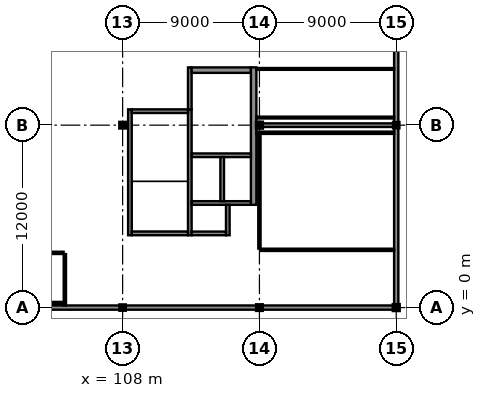
"""IFC4 building model, lengths in metres.
Left out: names, types, materials, properties, quantities, classifications, styles, units other than length and angle.
Written with IfcOpenShell. Run it as: python <this file> out.ifc"""

import sys

from ifc_helpers import new_model, si_unit, direction, frame, frame_2d, origin, origin_2d, place, context, subcontext, project, spatial, rectangle, i_section, extrude, element, fill, save


model = new_model("IFC4")
c1 = context("Model", 3, precision=1e-05, world=origin(), true_north=direction((0.0, 1.0)))
c2 = subcontext(c1, "Body", "Model", "MODEL_VIEW")
j1 = project(units=[si_unit("LENGTHUNIT", "METRE"), si_unit("PLANEANGLEUNIT", "RADIAN")], contexts=[c1])
p1 = place(None, origin())
s1 = spatial("IfcSite", under=j1, at=p1, CompositionType="ELEMENT")
p2 = place(p1, origin())
s2 = spatial("IfcBuilding", under=s1, at=p2, CompositionType="ELEMENT")
p3 = place(p2, frame((0.0, 0.0, 31.4)))
s3 = spatial("IfcBuildingStorey", under=s2, at=p3, CompositionType="ELEMENT", Elevation=31.4)
p4 = place(p3, frame((108.0, 0.0, 0.0), z_axis=(0.0, 0.0, 1.0), x_axis=(1.0, 0.0, 0.0)))
e1 = element("IfcColumn", 1, at=p4, inside=s3, PredefinedType="COLUMN", context=c2, shape_type="SweptSolid", body=[
    extrude(i_section(OverallWidth=0.26, OverallDepth=0.26, WebThickness=0.01, FlangeThickness=0.018, at=origin_2d()), origin(), (0.0, 0.0, 1.0), 4.0),
])
for number, where, z_axis, x_axis in (
    (2, (108.0, 12.0, 0.0), (0.0, 0.0, 1.0), (1.0, 0.0, 0.0)),
    (3, (117.0, 0.0, 0.0), (0.0, 0.0, 1.0), (1.0, 0.0, 0.0)),
):
    element("IfcColumn", number, at=place(p3, frame(where, z_axis=z_axis, x_axis=x_axis)), inside=s3, PredefinedType="COLUMN", context=c2, shape_type="SweptSolid", body=[
        extrude(i_section(OverallWidth=0.28, OverallDepth=0.28, WebThickness=0.01, FlangeThickness=0.018, at=origin_2d()), origin(), (0.0, 0.0, 1.0), 4.0),
    ])
for number, where, z_axis, x_axis in (
    (4, (117.0, 12.0, 0.0), (0.0, 0.0, 1.0), (0.0, 1.0, 0.0)),
    (5, (126.0, 0.0, 0.0), (0.0, 0.0, 1.0), (1.0, 0.0, 0.0)),
):
    element("IfcColumn", number, at=place(p3, frame(where, z_axis=z_axis, x_axis=x_axis)), inside=s3, PredefinedType="COLUMN", context=c2, shape_type="SweptSolid", body=[
        extrude(i_section(OverallWidth=0.3, OverallDepth=0.3, WebThickness=0.011, FlangeThickness=0.019, at=origin_2d()), origin(), (0.0, 0.0, 1.0), 4.0),
    ])
p5 = place(p3, frame((126.0, 12.0, 0.0), z_axis=(0.0, 0.0, 1.0), x_axis=(1.0, 0.0, 0.0)))
e6 = element("IfcColumn", 6, at=p5, inside=s3, PredefinedType="COLUMN", context=c2, shape_type="SweptSolid", body=[
    extrude(i_section(OverallWidth=0.26, OverallDepth=0.26, WebThickness=0.01, FlangeThickness=0.018, at=origin_2d()), origin(), (0.0, 0.0, 1.0), 4.0),
])
p6 = place(p3, frame((99.058, 0.0, 0.0), z_axis=(0.0, 0.0, 1.0), x_axis=(1.0, 0.0, 0.0)))
e7 = element("IfcWall", 7, at=p6, inside=s3, PredefinedType="SOLIDWALL", context=c2, shape_type="SweptSolid", body=[
    extrude(rectangle(XDim=8.934, YDim=0.28, at=frame_2d((4.467, 0.0))), origin(), (0.0, 0.0, 1.0), 3.355),
])
p7 = place(p6, frame((2.03, 0.0, 1.05)))
e8 = element("IfcOpeningElement", 8, at=p7, cuts=e7, PredefinedType="OPENING", context=c2, shape_type="SweptSolid", body=[
    extrude(rectangle(XDim=1.3, YDim=1.3, at=frame_2d((0.65, 0.65))), frame((0.0, 0.155, 0.0), z_axis=(0.0, -1.0, 0.0), x_axis=(1.0, 0.0, 0.0)), (0.0, 0.0, 1.0), 0.31),
])
p8 = place(p6, frame((5.604, 0.0, 1.05)))
e9 = element("IfcOpeningElement", 9, at=p8, cuts=e7, PredefinedType="OPENING", context=c2, shape_type="SweptSolid", body=[
    extrude(rectangle(XDim=1.3, YDim=1.3, at=frame_2d((0.65, 0.65))), frame((0.0, 0.155, 0.0), z_axis=(0.0, -1.0, 0.0), x_axis=(1.0, 0.0, 0.0)), (0.0, 0.0, 1.0), 0.31),
])
p9 = place(p3, frame((108.008, 0.0, 0.0), z_axis=(0.0, 0.0, 1.0), x_axis=(1.0, 0.0, 0.0)))
e10 = element("IfcWall", 10, at=p9, inside=s3, PredefinedType="SOLIDWALL", context=c2, shape_type="SweptSolid", body=[
    extrude(rectangle(XDim=8.984, YDim=0.28, at=frame_2d((4.492, 0.0))), origin(), (0.0, 0.0, 1.0), 3.355),
])
p10 = place(p9, frame((2.045, 0.0, 1.05)))
e11 = element("IfcOpeningElement", 11, at=p10, cuts=e10, PredefinedType="OPENING", context=c2, shape_type="SweptSolid", body=[
    extrude(rectangle(XDim=1.3, YDim=1.3, at=frame_2d((0.65, 0.65))), frame((0.0, 0.155, 0.0), z_axis=(0.0, -1.0, 0.0), x_axis=(1.0, 0.0, 0.0)), (0.0, 0.0, 1.0), 0.31),
])
p11 = place(p9, frame((5.639, 0.0, 1.05)))
e12 = element("IfcOpeningElement", 12, at=p11, cuts=e10, PredefinedType="OPENING", context=c2, shape_type="SweptSolid", body=[
    extrude(rectangle(XDim=1.3, YDim=1.3, at=frame_2d((0.65, 0.65))), frame((0.0, 0.155, 0.0), z_axis=(0.0, -1.0, 0.0), x_axis=(1.0, 0.0, 0.0)), (0.0, 0.0, 1.0), 0.31),
])
p12 = place(p3, frame((117.008, 0.0, 0.0), z_axis=(0.0, 0.0, 1.0), x_axis=(1.0, 0.0, 0.0)))
e13 = element("IfcWall", 13, at=p12, inside=s3, PredefinedType="SOLIDWALL", context=c2, shape_type="SweptSolid", body=[
    extrude(rectangle(XDim=8.984, YDim=0.28, at=frame_2d((4.492, 0.0))), origin(), (0.0, 0.0, 1.0), 3.355),
])
p13 = place(p12, frame((2.045, 0.0, 1.05)))
e14 = element("IfcOpeningElement", 14, at=p13, cuts=e13, PredefinedType="OPENING", context=c2, shape_type="SweptSolid", body=[
    extrude(rectangle(XDim=1.3, YDim=1.3, at=frame_2d((0.65, 0.65))), frame((0.0, 0.155, 0.0), z_axis=(0.0, -1.0, 0.0), x_axis=(1.0, 0.0, 0.0)), (0.0, 0.0, 1.0), 0.31),
])
p14 = place(p12, frame((5.639, 0.0, 1.05)))
e15 = element("IfcOpeningElement", 15, at=p14, cuts=e13, PredefinedType="OPENING", context=c2, shape_type="SweptSolid", body=[
    extrude(rectangle(XDim=1.3, YDim=1.3, at=frame_2d((0.65, 0.65))), frame((0.0, 0.155, 0.0), z_axis=(0.0, -1.0, 0.0), x_axis=(1.0, 0.0, 0.0)), (0.0, 0.0, 1.0), 0.31),
])
p15 = place(p3, frame((126.0, 0.148, 0.0), z_axis=(0.0, 0.0, 1.0), x_axis=(0.0, 1.0, 0.0)))
e16 = element("IfcWall", 16, at=p15, inside=s3, PredefinedType="SOLIDWALL", context=c2, shape_type="SweptSolid", body=[
    extrude(rectangle(XDim=11.724, YDim=0.28, at=frame_2d((5.862, 0.0))), origin(), (0.0, 0.0, 1.0), 3.245),
])
p16 = place(p15, frame((2.012, 0.0, 1.05)))
e17 = element("IfcOpeningElement", 17, at=p16, cuts=e16, PredefinedType="OPENING", context=c2, shape_type="SweptSolid", body=[
    extrude(rectangle(XDim=1.3, YDim=1.3, at=frame_2d((0.65, 0.65))), frame((0.0, 0.155, 0.0), z_axis=(0.0, -1.0, 0.0), x_axis=(1.0, 0.0, 0.0)), (0.0, 0.0, 1.0), 0.31),
])
p17 = place(p15, frame((7.557, 0.0, 1.05)))
e18 = element("IfcOpeningElement", 18, at=p17, cuts=e16, PredefinedType="OPENING", context=c2, shape_type="SweptSolid", body=[
    extrude(rectangle(XDim=1.3, YDim=1.3, at=frame_2d((0.65, 0.65))), frame((0.0, 0.155, 0.0), z_axis=(0.0, -1.0, 0.0), x_axis=(1.0, 0.0, 0.0)), (0.0, 0.0, 1.0), 0.31),
])
p18 = place(p3, frame((126.0, 12.128, 0.0), z_axis=(0.0, 0.0, 1.0), x_axis=(0.0, 1.0, 0.0)))
e19 = element("IfcWall", 19, at=p18, inside=s3, PredefinedType="SOLIDWALL", context=c2, shape_type="SweptSolid", body=[
    extrude(rectangle(XDim=11.624, YDim=0.28, at=frame_2d((5.812, 0.0))), origin(), (0.0, 0.0, 1.0), 3.245),
])
p19 = place(p18, frame((2.032, 0.0, 1.05)))
e20 = element("IfcOpeningElement", 20, at=p19, cuts=e19, PredefinedType="OPENING", context=c2, shape_type="SweptSolid", body=[
    extrude(rectangle(XDim=1.3, YDim=1.3, at=frame_2d((0.65, 0.65))), frame((0.0, 0.155, 0.0), z_axis=(0.0, -1.0, 0.0), x_axis=(1.0, 0.0, 0.0)), (0.0, 0.0, 1.0), 0.31),
])
p20 = place(p18, frame((7.487, 0.0, 1.05)))
e21 = element("IfcOpeningElement", 21, at=p20, cuts=e19, PredefinedType="OPENING", context=c2, shape_type="SweptSolid", body=[
    extrude(rectangle(XDim=1.3, YDim=1.3, at=frame_2d((0.65, 0.65))), frame((0.0, 0.155, 0.0), z_axis=(0.0, -1.0, 0.0), x_axis=(1.0, 0.0, 0.0)), (0.0, 0.0, 1.0), 0.31),
])
p21 = place(p3, frame((108.48, 4.76, 0.0), z_axis=(0.0, 0.0, 1.0), x_axis=(0.0, 1.0, 0.0)))
e22 = element("IfcWall", 22, at=p21, inside=s3, PredefinedType="SHEAR", context=c2, shape_type="SweptSolid", body=[
    extrude(rectangle(XDim=8.28, YDim=0.24, at=frame_2d((4.14, 0.0))), origin(), (0.0, 0.0, 1.0), 3.81),
])
p22 = place(p3, frame((112.42, 4.76, 0.0), z_axis=(0.0, 0.0, 1.0), x_axis=(0.0, 1.0, 0.0)))
e23 = element("IfcWall", 23, at=p22, inside=s3, PredefinedType="SHEAR", context=c2, shape_type="SweptSolid", body=[
    extrude(rectangle(XDim=8.28, YDim=0.24, at=frame_2d((4.14, 0.0))), origin(), (0.0, 0.0, 1.0), 3.81),
])
p23 = place(p22, frame((6.49, 0.0, 0.0)))
e24 = element("IfcOpeningElement", 24, at=p23, cuts=e23, PredefinedType="OPENING", context=c2, shape_type="SweptSolid", body=[
    extrude(rectangle(XDim=1.3, YDim=2.2, at=frame_2d((0.65, 1.1))), frame((0.0, 0.135, 0.0), z_axis=(0.0, -1.0, 0.0), x_axis=(1.0, 0.0, 0.0)), (0.0, 0.0, 1.0), 0.27),
])
for number, where, z_axis, x_axis in (
    (25, (108.6, 4.88, 0.0), (0.0, 0.0, 1.0), (1.0, 0.0, 0.0)),
    (26, (108.6, 12.92, 0.0), (0.0, 0.0, 1.0), (1.0, 0.0, 0.0)),
):
    element("IfcWall", number, at=place(p3, frame(where, z_axis=z_axis, x_axis=x_axis)), inside=s3, PredefinedType="SHEAR", context=c2, shape_type="SweptSolid", body=[
        extrude(rectangle(XDim=3.7, YDim=0.24, at=frame_2d((1.85, 0.0))), origin(), (0.0, 0.0, 1.0), 3.81),
    ])
p24 = place(p3, frame((112.42, 13.04, 0.0), z_axis=(0.0, 0.0, 1.0), x_axis=(0.0, 1.0, 0.0)))
e27 = element("IfcWall", 27, at=p24, inside=s3, PredefinedType="SHEAR", context=c2, shape_type="SweptSolid", body=[
    extrude(rectangle(XDim=2.76, YDim=0.24, at=frame_2d((1.38, 0.0))), origin(), (0.0, 0.0, 1.0), 3.66),
])
p25 = place(p3, frame((112.54, 15.62, 0.0), z_axis=(0.0, 0.0, 1.0), x_axis=(1.0, 0.0, 0.0)))
e28 = element("IfcWall", 28, at=p25, inside=s3, PredefinedType="SHEAR", context=c2, shape_type="SweptSolid", body=[
    extrude(rectangle(XDim=3.9, YDim=0.36, at=frame_2d((1.95, 0.0))), origin(), (0.0, 0.0, 1.0), 3.66),
])
p26 = place(p25, frame((1.15, 0.0, 0.0)))
e29 = element("IfcOpeningElement", 29, at=p26, cuts=e28, PredefinedType="OPENING", context=c2, shape_type="SweptSolid", body=[
    extrude(rectangle(XDim=1.6, YDim=2.25, at=frame_2d((0.8, 1.125))), frame((0.0, 0.195, 0.0), z_axis=(0.0, -1.0, 0.0), x_axis=(1.0, 0.0, 0.0)), (0.0, 0.0, 1.0), 0.39),
])
p27 = place(p3, frame((116.62, 6.76, 0.0), z_axis=(0.0, 0.0, 1.0), x_axis=(0.0, 1.0, 0.0)))
e30 = element("IfcWall", 30, at=p27, inside=s3, PredefinedType="SHEAR", context=c2, shape_type="SweptSolid", body=[
    extrude(rectangle(XDim=9.04, YDim=0.36, at=frame_2d((4.52, 0.0))), origin(), (0.0, 0.0, 1.0), 3.66),
])
p28 = place(p3, frame((112.54, 10.02, 0.0), z_axis=(0.0, 0.0, 1.0), x_axis=(1.0, 0.0, 0.0)))
e31 = element("IfcWall", 31, at=p28, inside=s3, PredefinedType="SHEAR", context=c2, shape_type="SweptSolid", body=[
    extrude(rectangle(XDim=3.9, YDim=0.24, at=frame_2d((1.95, 0.0))), origin(), (0.0, 0.0, 1.0), 3.81),
])
p29 = place(p28, frame((0.235, 0.0, 0.0)))
e32 = element("IfcOpeningElement", 32, at=p29, cuts=e31, PredefinedType="OPENING", context=c2, shape_type="SweptSolid", body=[
    extrude(rectangle(XDim=1.6, YDim=2.3, at=frame_2d((0.8, 1.15))), frame((0.0, 0.135, 0.0), z_axis=(0.0, -1.0, 0.0), x_axis=(1.0, 0.0, 0.0)), (0.0, 0.0, 1.0), 0.27),
])
p30 = place(p28, frame((2.185, 0.0, 0.0)))
e33 = element("IfcOpeningElement", 33, at=p30, cuts=e31, PredefinedType="OPENING", context=c2, shape_type="SweptSolid", body=[
    extrude(rectangle(XDim=1.6, YDim=2.3, at=frame_2d((0.8, 1.15))), frame((0.0, 0.135, 0.0), z_axis=(0.0, -1.0, 0.0), x_axis=(1.0, 0.0, 0.0)), (0.0, 0.0, 1.0), 0.27),
])
p31 = place(p3, frame((112.54, 6.88, 0.0), z_axis=(0.0, 0.0, 1.0), x_axis=(1.0, 0.0, 0.0)))
e34 = element("IfcWall", 34, at=p31, inside=s3, PredefinedType="SHEAR", context=c2, shape_type="SweptSolid", body=[
    extrude(rectangle(XDim=3.9, YDim=0.24, at=frame_2d((1.95, 0.0))), origin(), (0.0, 0.0, 1.0), 3.81),
])
p32 = place(p3, frame((114.55, 7.0, 0.0), z_axis=(0.0, 0.0, 1.0), x_axis=(0.0, 1.0, 0.0)))
e35 = element("IfcWall", 35, at=p32, inside=s3, PredefinedType="SHEAR", context=c2, shape_type="SweptSolid", body=[
    extrude(rectangle(XDim=2.9, YDim=0.24, at=frame_2d((1.45, 0.0))), origin(), (0.0, 0.0, 1.0), 3.81),
])
p33 = place(p3, frame((114.92, 4.76, 0.0), z_axis=(0.0, 0.0, 1.0), x_axis=(0.0, 1.0, 0.0)))
e36 = element("IfcWall", 36, at=p33, inside=s3, PredefinedType="SHEAR", context=c2, shape_type="SweptSolid", body=[
    extrude(rectangle(XDim=2.0, YDim=0.24, at=frame_2d((1.0, 0.0))), origin(), (0.0, 0.0, 1.0), 3.81),
])
p34 = place(p3, frame((112.54, 4.88, 0.0), z_axis=(0.0, 0.0, 1.0), x_axis=(1.0, 0.0, 0.0)))
e37 = element("IfcWall", 37, at=p34, inside=s3, PredefinedType="SHEAR", context=c2, shape_type="SweptSolid", body=[
    extrude(rectangle(XDim=2.26, YDim=0.24, at=frame_2d((1.13, 0.0))), origin(), (0.0, 0.0, 1.0), 3.81),
])
p35 = place(p3, frame((117.148, 12.0, 0.0), z_axis=(0.0, 0.0, 1.0), x_axis=(1.0, 0.0, 0.0)))
e38 = element("IfcWall", 38, at=p35, inside=s3, PredefinedType="SHEAR", context=c2, shape_type="SweptSolid", body=[
    extrude(rectangle(XDim=8.844, YDim=0.24, at=frame_2d((4.422, 0.0))), origin(), (0.0, 0.0, 1.0), 3.305),
])
p36 = place(p3, frame((45.88, 3.6, 0.0), z_axis=(0.0, 0.0, 1.0), x_axis=(1.0, 0.0, 0.0)))
e39 = element("IfcWall", 39, at=p36, inside=s3, PredefinedType="PARTITIONING", context=c2, shape_type="SweptSolid", body=[
    extrude(rectangle(XDim=58.24, YDim=0.15, at=frame_2d((29.12, 0.0))), origin(), (0.0, 0.0, 1.0), 3.64),
])
p37 = place(p36, frame((27.795, 0.0, 0.0)))
e40 = element("IfcOpeningElement", 40, at=p37, cuts=e39, PredefinedType="OPENING", context=c2, shape_type="SweptSolid", body=[
    extrude(rectangle(XDim=1.05, YDim=2.25, at=frame_2d((0.525, 1.125))), frame((0.0, 0.09, 0.0), z_axis=(0.0, -1.0, 0.0), x_axis=(1.0, 0.0, 0.0)), (0.0, 0.0, 1.0), 0.18),
])
p38 = place(p3, frame((104.2, 3.52, 0.0), z_axis=(0.0, 0.0, 1.0), x_axis=(0.0, -1.0, 0.0)))
e41 = element("IfcWall", 41, at=p38, inside=s3, PredefinedType="PARTITIONING", context=c2, shape_type="SweptSolid", body=[
    extrude(rectangle(XDim=3.385, YDim=0.15, at=frame_2d((1.692, 0.0))), origin(), (0.0, 0.0, 1.0), 3.64),
])
p39 = place(p3, frame((104.13, 0.3, 0.0), z_axis=(0.0, 0.0, 1.0), x_axis=(-1.0, 0.0, 0.0)))
e42 = element("IfcWall", 42, at=p39, inside=s3, PredefinedType="PARTITIONING", context=c2, shape_type="SweptSolid", body=[
    extrude(rectangle(XDim=31.851, YDim=0.15, at=frame_2d((15.925, 0.0))), origin(), (0.0, 0.0, 1.0), 3.64),
])
p40 = place(p3, frame((117.0, 3.88, 0.0), z_axis=(0.0, 0.0, 1.0), x_axis=(0.0, 1.0, 0.0)))
e43 = element("IfcWall", 43, at=p40, inside=s3, PredefinedType="PARTITIONING", context=c2, shape_type="SweptSolid", body=[
    extrude(rectangle(XDim=7.54, YDim=0.15, at=frame_2d((3.77, 0.0))), origin(), (0.0, 0.0, 1.0), 3.305),
])
p41 = place(p3, frame((116.795, 11.5, 0.0), z_axis=(0.0, 0.0, 1.0), x_axis=(1.0, 0.0, 0.0)))
e44 = element("IfcWall", 44, at=p41, inside=s3, PredefinedType="PARTITIONING", context=c2, shape_type="SweptSolid", body=[
    extrude(rectangle(XDim=9.07, YDim=0.15, at=frame_2d((4.535, 0.0))), origin(), (0.0, 0.0, 1.0), 3.64),
])
p42 = place(p3, frame((125.865, 3.8, 0.0), z_axis=(0.0, 0.0, 1.0), x_axis=(-1.0, 0.0, 0.0)))
e45 = element("IfcWall", 45, at=p42, inside=s3, PredefinedType="PARTITIONING", context=c2, shape_type="SweptSolid", body=[
    extrude(rectangle(XDim=8.785, YDim=0.15, at=frame_2d((4.393, 0.0))), origin(), (0.0, 0.0, 1.0), 3.64),
])
p43 = place(p42, frame((3.867, 0.0, 0.0)))
e46 = element("IfcOpeningElement", 46, at=p43, cuts=e45, PredefinedType="OPENING", context=c2, shape_type="SweptSolid", body=[
    extrude(rectangle(XDim=1.05, YDim=2.25, at=frame_2d((0.525, 1.125))), frame((0.0, 0.09, 0.0), z_axis=(0.0, -1.0, 0.0), x_axis=(1.0, 0.0, 0.0)), (0.0, 0.0, 1.0), 0.18),
])
p44 = place(p3, frame((125.865, 12.5, 0.0), z_axis=(0.0, 0.0, 1.0), x_axis=(-1.0, 0.0, 0.0)))
e47 = element("IfcWall", 47, at=p44, inside=s3, PredefinedType="PARTITIONING", context=c2, shape_type="SweptSolid", body=[
    extrude(rectangle(XDim=9.07, YDim=0.12, at=frame_2d((4.535, 0.0))), origin(), (0.0, 0.0, 1.0), 3.64),
])
p45 = place(p3, frame((116.795, 15.7, 0.0), z_axis=(0.0, 0.0, 1.0), x_axis=(1.0, 0.0, 0.0)))
e48 = element("IfcWall", 48, at=p45, inside=s3, PredefinedType="PARTITIONING", context=c2, shape_type="SweptSolid", body=[
    extrude(rectangle(XDim=9.07, YDim=0.12, at=frame_2d((4.535, 0.0))), origin(), (0.0, 0.0, 1.0), 3.64),
])
p46 = place(p45, frame((4.06, 0.0, 0.0)))
e49 = element("IfcOpeningElement", 49, at=p46, cuts=e48, PredefinedType="OPENING", context=c2, shape_type="SweptSolid", body=[
    extrude(rectangle(XDim=0.95, YDim=2.15, at=frame_2d((0.475, 1.075))), frame((0.0, 0.075, 0.0), z_axis=(0.0, -1.0, 0.0), x_axis=(1.0, 0.0, 0.0)), (0.0, 0.0, 1.0), 0.15),
])
p47 = place(p8, origin())
e50 = element("IfcWindow", 50, at=p47, inside=s3, PartitioningType="SINGLE_PANEL", PredefinedType="WINDOW", context=c2, shape_type="SweptSolid", body=[
    extrude(rectangle(XDim=1.3, YDim=1.3, at=frame_2d((0.65, 0.65))), frame((0.0, 0.03, 0.0), z_axis=(0.0, -1.0, 0.0), x_axis=(1.0, 0.0, 0.0)), (0.0, 0.0, 1.0), 0.06),
])
fill(e9, e50)
p48 = place(p10, origin())
e51 = element("IfcWindow", 51, at=p48, inside=s3, PartitioningType="SINGLE_PANEL", PredefinedType="WINDOW", context=c2, shape_type="SweptSolid", body=[
    extrude(rectangle(XDim=1.3, YDim=1.3, at=frame_2d((0.65, 0.65))), frame((0.0, 0.03, 0.0), z_axis=(0.0, -1.0, 0.0), x_axis=(1.0, 0.0, 0.0)), (0.0, 0.0, 1.0), 0.06),
])
fill(e11, e51)
p49 = place(p11, origin())
e52 = element("IfcWindow", 52, at=p49, inside=s3, PartitioningType="SINGLE_PANEL", PredefinedType="WINDOW", context=c2, shape_type="SweptSolid", body=[
    extrude(rectangle(XDim=1.3, YDim=1.3, at=frame_2d((0.65, 0.65))), frame((0.0, 0.03, 0.0), z_axis=(0.0, -1.0, 0.0), x_axis=(1.0, 0.0, 0.0)), (0.0, 0.0, 1.0), 0.06),
])
fill(e12, e52)
p50 = place(p13, origin())
e53 = element("IfcWindow", 53, at=p50, inside=s3, PartitioningType="SINGLE_PANEL", PredefinedType="WINDOW", context=c2, shape_type="SweptSolid", body=[
    extrude(rectangle(XDim=1.3, YDim=1.3, at=frame_2d((0.65, 0.65))), frame((0.0, 0.03, 0.0), z_axis=(0.0, -1.0, 0.0), x_axis=(1.0, 0.0, 0.0)), (0.0, 0.0, 1.0), 0.06),
])
fill(e14, e53)
p51 = place(p14, origin())
e54 = element("IfcWindow", 54, at=p51, inside=s3, PartitioningType="SINGLE_PANEL", PredefinedType="WINDOW", context=c2, shape_type="SweptSolid", body=[
    extrude(rectangle(XDim=1.3, YDim=1.3, at=frame_2d((0.65, 0.65))), frame((0.0, 0.03, 0.0), z_axis=(0.0, -1.0, 0.0), x_axis=(1.0, 0.0, 0.0)), (0.0, 0.0, 1.0), 0.06),
])
fill(e15, e54)
p52 = place(p16, origin())
e55 = element("IfcWindow", 55, at=p52, inside=s3, PartitioningType="SINGLE_PANEL", PredefinedType="WINDOW", context=c2, shape_type="SweptSolid", body=[
    extrude(rectangle(XDim=1.3, YDim=1.3, at=frame_2d((0.65, 0.65))), frame((0.0, 0.03, 0.0), z_axis=(0.0, -1.0, 0.0), x_axis=(1.0, 0.0, 0.0)), (0.0, 0.0, 1.0), 0.06),
])
fill(e17, e55)
p53 = place(p17, origin())
e56 = element("IfcWindow", 56, at=p53, inside=s3, PartitioningType="SINGLE_PANEL", PredefinedType="WINDOW", context=c2, shape_type="SweptSolid", body=[
    extrude(rectangle(XDim=1.3, YDim=1.3, at=frame_2d((0.65, 0.65))), frame((0.0, 0.03, 0.0), z_axis=(0.0, -1.0, 0.0), x_axis=(1.0, 0.0, 0.0)), (0.0, 0.0, 1.0), 0.06),
])
fill(e18, e56)
p54 = place(p19, origin())
e57 = element("IfcWindow", 57, at=p54, inside=s3, PartitioningType="SINGLE_PANEL", PredefinedType="WINDOW", context=c2, shape_type="SweptSolid", body=[
    extrude(rectangle(XDim=1.3, YDim=1.3, at=frame_2d((0.65, 0.65))), frame((0.0, 0.03, 0.0), z_axis=(0.0, -1.0, 0.0), x_axis=(1.0, 0.0, 0.0)), (0.0, 0.0, 1.0), 0.06),
])
fill(e20, e57)
p55 = place(p23, frame((1.3, 0.0, 0.0), z_axis=(0.0, 0.0, 1.0), x_axis=(-1.0, 0.0, 0.0)))
e58 = element("IfcDoor", 58, at=p55, inside=s3, OperationType="SINGLE_SWING_LEFT", PredefinedType="DOOR", context=c2, shape_type="SweptSolid", body=[
    extrude(rectangle(XDim=1.3, YDim=2.2, at=frame_2d((0.65, 1.1))), frame((0.0, 0.025, 0.0), z_axis=(0.0, -1.0, 0.0), x_axis=(1.0, 0.0, 0.0)), (0.0, 0.0, 1.0), 0.05),
])
fill(e24, e58)
p56 = place(p26, origin())
e59 = element("IfcDoor", 59, at=p56, inside=s3, OperationType="DOUBLE_DOOR_SINGLE_SWING", PredefinedType="DOOR", context=c2, shape_type="SweptSolid", body=[
    extrude(rectangle(XDim=1.6, YDim=2.25, at=frame_2d((0.8, 1.125))), frame((0.0, 0.025, 0.0), z_axis=(0.0, -1.0, 0.0), x_axis=(1.0, 0.0, 0.0)), (0.0, 0.0, 1.0), 0.05),
])
fill(e29, e59)
p57 = place(p29, origin())
e60 = element("IfcDoor", 60, at=p57, inside=s3, OperationType="DOUBLE_DOOR_SLIDING", PredefinedType="DOOR", context=c2, shape_type="SweptSolid", body=[
    extrude(rectangle(XDim=1.6, YDim=2.3, at=frame_2d((0.8, 1.15))), frame((0.0, 0.025, 0.0), z_axis=(0.0, -1.0, 0.0), x_axis=(1.0, 0.0, 0.0)), (0.0, 0.0, 1.0), 0.05),
])
fill(e32, e60)
p58 = place(p30, origin())
e61 = element("IfcDoor", 61, at=p58, inside=s3, OperationType="DOUBLE_DOOR_SLIDING", PredefinedType="DOOR", context=c2, shape_type="SweptSolid", body=[
    extrude(rectangle(XDim=1.6, YDim=2.3, at=frame_2d((0.8, 1.15))), frame((0.0, 0.025, 0.0), z_axis=(0.0, -1.0, 0.0), x_axis=(1.0, 0.0, 0.0)), (0.0, 0.0, 1.0), 0.05),
])
fill(e33, e61)
p59 = place(p43, origin())
e62 = element("IfcDoor", 62, at=p59, inside=s3, OperationType="SINGLE_SWING_LEFT", PredefinedType="DOOR", context=c2, shape_type="SweptSolid", body=[
    extrude(rectangle(XDim=1.05, YDim=2.25, at=frame_2d((0.525, 1.125))), frame((0.0, 0.025, 0.0), z_axis=(0.0, -1.0, 0.0), x_axis=(1.0, 0.0, 0.0)), (0.0, 0.0, 1.0), 0.05),
])
fill(e46, e62)
p60 = place(p46, frame((0.95, 0.0, 0.0), z_axis=(0.0, 0.0, 1.0), x_axis=(-1.0, 0.0, 0.0)))
e63 = element("IfcDoor", 63, at=p60, inside=s3, OperationType="SINGLE_SWING_RIGHT", PredefinedType="DOOR", context=c2, shape_type="SweptSolid", body=[
    extrude(rectangle(XDim=0.95, YDim=2.15, at=frame_2d((0.475, 1.075))), frame((0.0, 0.025, 0.0), z_axis=(0.0, -1.0, 0.0), x_axis=(1.0, 0.0, 0.0)), (0.0, 0.0, 1.0), 0.05),
])
fill(e49, e63)
save(model, sys.argv[1])
